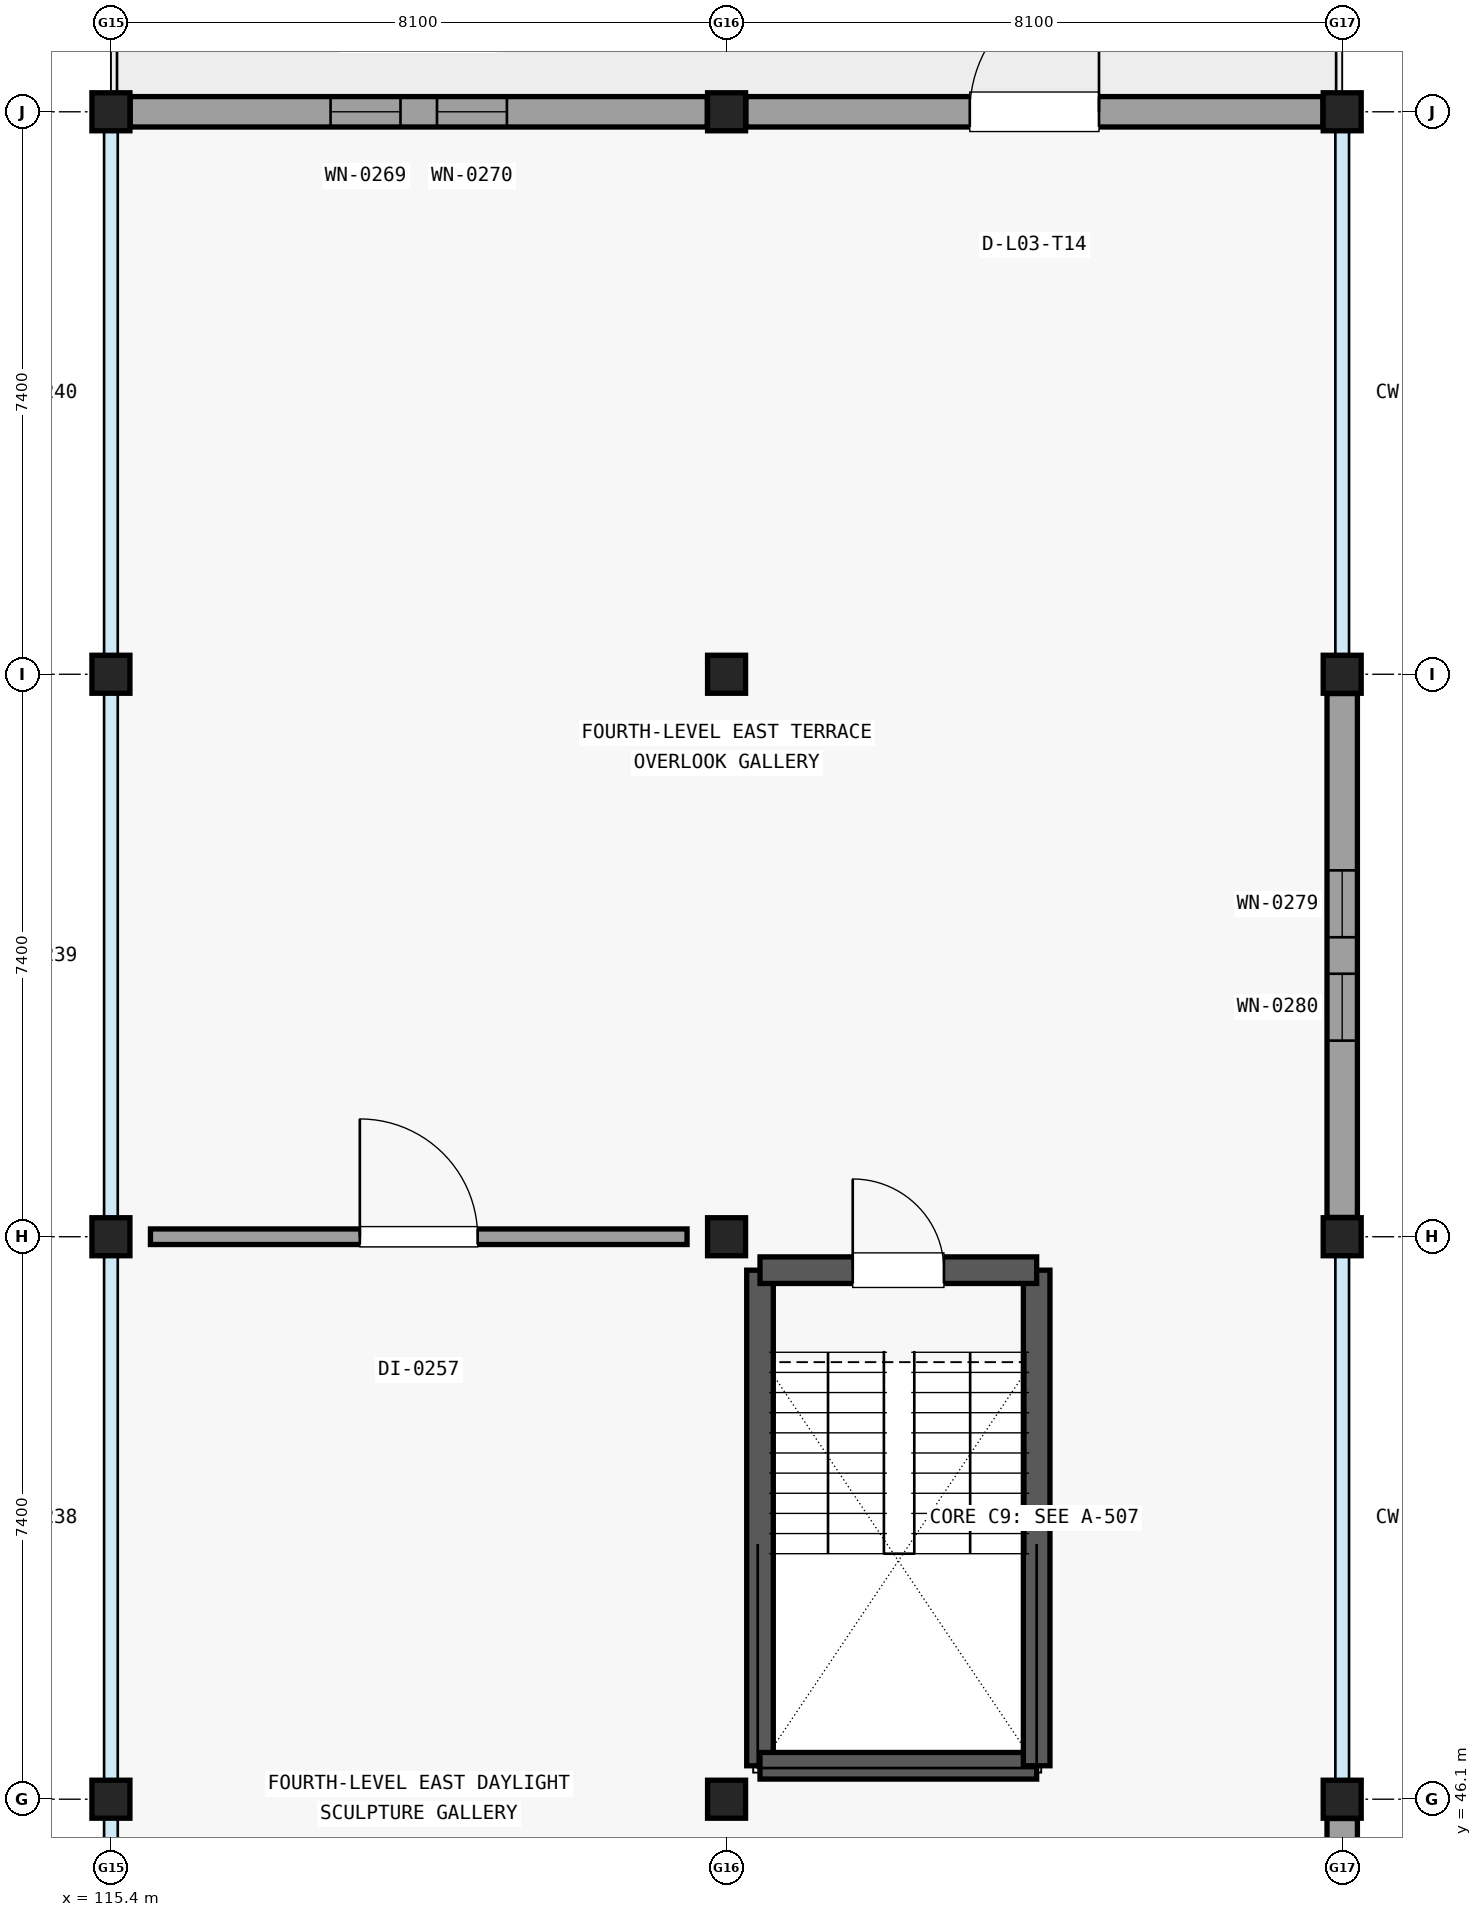
"""IFC4 building model, lengths in metres.
Left out: names, types, materials, properties, quantities, classifications, styles, units other than length and angle.
Written with IfcOpenShell. Run it as: python <this file> out.ifc"""

import sys

from ifc_helpers import new_model, si_unit, direction, frame, frame_2d, origin, origin_2d, place, context, subcontext, project, spatial, rectangle, extrude, element, fill, save


model = new_model("IFC4")
c1 = context("Model", 3, precision=1e-05, world=origin(), true_north=direction((0.0, 1.0)))
c2 = subcontext(c1, "Body", "Model", "MODEL_VIEW")
j1 = project(units=[si_unit("LENGTHUNIT", "METRE"), si_unit("PLANEANGLEUNIT", "RADIAN")], contexts=[c1])
p1 = place(None, origin())
s1 = spatial("IfcSite", under=j1, at=p1, CompositionType="ELEMENT")
p2 = place(p1, origin())
s2 = spatial("IfcBuilding", under=s1, at=p2, CompositionType="ELEMENT")
p3 = place(p2, frame((0.0, 0.0, 13.8)))
s3 = spatial("IfcBuildingStorey", under=s2, at=p3, CompositionType="ELEMENT", Elevation=13.8)
for number, where, z_axis, x_axis in (
    (1, (115.4, 46.1, 0.0), (0.0, 0.0, 1.0), (1.0, 0.0, 0.0)),
    (2, (115.4, 53.5, 0.0), (0.0, 0.0, 1.0), (1.0, 0.0, 0.0)),
    (3, (115.4, 60.9, 0.0), (0.0, 0.0, 1.0), (1.0, 0.0, 0.0)),
    (4, (115.4, 68.3, 0.0), (0.0, 0.0, 1.0), (1.0, 0.0, 0.0)),
    (5, (123.5, 46.1, 0.0), (0.0, 0.0, 1.0), (1.0, 0.0, 0.0)),
    (6, (123.5, 53.5, 0.0), (0.0, 0.0, 1.0), (1.0, 0.0, 0.0)),
    (7, (123.5, 60.9, 0.0), (0.0, 0.0, 1.0), (1.0, 0.0, 0.0)),
    (8, (123.5, 68.3, 0.0), (0.0, 0.0, 1.0), (1.0, 0.0, 0.0)),
    (9, (131.6, 46.1, 0.0), (0.0, 0.0, 1.0), (1.0, 0.0, 0.0)),
    (10, (131.6, 53.5, 0.0), (0.0, 0.0, 1.0), (1.0, 0.0, 0.0)),
    (11, (131.6, 60.9, 0.0), (0.0, 0.0, 1.0), (1.0, 0.0, 0.0)),
    (12, (131.6, 68.3, 0.0), (0.0, 0.0, 1.0), (1.0, 0.0, 0.0)),
):
    element("IfcColumn", number, at=place(p3, frame(where, z_axis=z_axis, x_axis=x_axis)), inside=s3, PredefinedType="COLUMN", context=c2, shape_type="SweptSolid", body=[
        extrude(rectangle(XDim=0.5, YDim=0.5, at=origin_2d()), origin(), (0.0, 0.0, 1.0), 3.38),
    ])
p4 = place(p3, frame((115.654, 68.3, 0.0), z_axis=(0.0, 0.0, 1.0), x_axis=(1.0, 0.0, 0.0)))
e13 = element("IfcWall", 13, at=p4, inside=s3, PredefinedType="SOLIDWALL", context=c2, shape_type="SweptSolid", body=[
    extrude(rectangle(XDim=7.592, YDim=0.4, at=frame_2d((3.796, 0.0))), origin(), (0.0, 0.0, 1.0), 2.908),
])
p5 = place(p4, frame((2.636, 0.0, 0.6)))
e14 = element("IfcOpeningElement", 14, at=p5, cuts=e13, PredefinedType="OPENING", context=c2, shape_type="SweptSolid", body=[
    extrude(rectangle(XDim=0.92, YDim=2.02, at=frame_2d((0.46, 1.01))), frame((0.0, 0.21, 0.0), z_axis=(0.0, -1.0, 0.0), x_axis=(1.0, 0.0, 0.0)), (0.0, 0.0, 1.0), 0.42),
])
p6 = place(p4, frame((4.036, 0.0, 0.6)))
e15 = element("IfcOpeningElement", 15, at=p6, cuts=e13, PredefinedType="OPENING", context=c2, shape_type="SweptSolid", body=[
    extrude(rectangle(XDim=0.92, YDim=2.02, at=frame_2d((0.46, 1.01))), frame((0.0, 0.21, 0.0), z_axis=(0.0, -1.0, 0.0), x_axis=(1.0, 0.0, 0.0)), (0.0, 0.0, 1.0), 0.42),
])
p7 = place(p3, frame((131.6, 45.846, 0.0), z_axis=(0.0, 0.0, 1.0), x_axis=(0.0, -1.0, 0.0)))
e16 = element("IfcWall", 16, at=p7, inside=s3, PredefinedType="SOLIDWALL", context=c2, shape_type="SweptSolid", body=[
    extrude(rectangle(XDim=6.892, YDim=0.4, at=frame_2d((3.446, 0.0))), origin(), (0.0, 0.0, 1.0), 2.908),
])
p8 = place(p7, frame((2.366, 0.0, 0.6)))
e17 = element("IfcOpeningElement", 17, at=p8, cuts=e16, PredefinedType="OPENING", context=c2, shape_type="SweptSolid", body=[
    extrude(rectangle(XDim=0.84, YDim=1.96, at=frame_2d((0.42, 0.98))), frame((0.0, 0.21, 0.0), z_axis=(0.0, -1.0, 0.0), x_axis=(1.0, 0.0, 0.0)), (0.0, 0.0, 1.0), 0.42),
])
p9 = place(p7, frame((3.686, 0.0, 0.6)))
e18 = element("IfcOpeningElement", 18, at=p9, cuts=e16, PredefinedType="OPENING", context=c2, shape_type="SweptSolid", body=[
    extrude(rectangle(XDim=0.84, YDim=1.96, at=frame_2d((0.42, 0.98))), frame((0.0, 0.21, 0.0), z_axis=(0.0, -1.0, 0.0), x_axis=(1.0, 0.0, 0.0)), (0.0, 0.0, 1.0), 0.42),
])
p10 = place(p3, frame((131.6, 60.646, 0.0), z_axis=(0.0, 0.0, 1.0), x_axis=(0.0, -1.0, 0.0)))
e19 = element("IfcWall", 19, at=p10, inside=s3, PredefinedType="SOLIDWALL", context=c2, shape_type="SweptSolid", body=[
    extrude(rectangle(XDim=6.892, YDim=0.4, at=frame_2d((3.446, 0.0))), origin(), (0.0, 0.0, 1.0), 2.908),
])
p11 = place(p10, frame((2.326, 0.0, 0.6)))
e20 = element("IfcOpeningElement", 20, at=p11, cuts=e19, PredefinedType="OPENING", context=c2, shape_type="SweptSolid", body=[
    extrude(rectangle(XDim=0.88, YDim=1.94, at=frame_2d((0.44, 0.97))), frame((0.0, 0.21, 0.0), z_axis=(0.0, -1.0, 0.0), x_axis=(1.0, 0.0, 0.0)), (0.0, 0.0, 1.0), 0.42),
])
p12 = place(p10, frame((3.686, 0.0, 0.6)))
e21 = element("IfcOpeningElement", 21, at=p12, cuts=e19, PredefinedType="OPENING", context=c2, shape_type="SweptSolid", body=[
    extrude(rectangle(XDim=0.88, YDim=1.94, at=frame_2d((0.44, 0.97))), frame((0.0, 0.21, 0.0), z_axis=(0.0, -1.0, 0.0), x_axis=(1.0, 0.0, 0.0)), (0.0, 0.0, 1.0), 0.42),
])
p13 = place(p3, frame((123.754, 68.3, 0.0), z_axis=(0.0, 0.0, 1.0), x_axis=(1.0, 0.0, 0.0)))
e22 = element("IfcWall", 22, at=p13, inside=s3, PredefinedType="SOLIDWALL", context=c2, shape_type="SweptSolid", body=[
    extrude(rectangle(XDim=7.592, YDim=0.4, at=frame_2d((3.796, 0.0))), origin(), (0.0, 0.0, 1.0), 2.908),
])
p14 = place(p13, frame((2.946, 0.0, 0.0)))
e23 = element("IfcOpeningElement", 23, at=p14, cuts=e22, PredefinedType="OPENING", context=c2, shape_type="SweptSolid", body=[
    extrude(rectangle(XDim=1.7, YDim=2.15, at=frame_2d((0.85, 1.075))), frame((0.0, 0.21, 0.0), z_axis=(0.0, -1.0, 0.0), x_axis=(1.0, 0.0, 0.0)), (0.0, 0.0, 1.0), 0.42),
])
p15 = place(p3, frame((123.94, 46.54, 0.0), z_axis=(0.0, 0.0, 1.0), x_axis=(0.0, 1.0, 0.0)))
e24 = element("IfcWall", 24, at=p15, inside=s3, PredefinedType="SHEAR", context=c2, shape_type="SweptSolid", body=[
    extrude(rectangle(XDim=6.52, YDim=0.35, at=frame_2d((3.26, 0.0))), origin(), (0.0, 0.0, 1.0), 3.375),
])
p16 = place(p3, frame((123.94, 46.54, 0.0), z_axis=(0.0, 0.0, 1.0), x_axis=(1.0, 0.0, 0.0)))
e25 = element("IfcWall", 25, at=p16, inside=s3, PredefinedType="SHEAR", context=c2, shape_type="SweptSolid", body=[
    extrude(rectangle(XDim=3.64, YDim=0.35, at=frame_2d((1.82, 0.0))), origin(), (0.0, 0.0, 1.0), 3.375),
])
p17 = place(p3, frame((127.58, 46.54, 0.0), z_axis=(0.0, 0.0, 1.0), x_axis=(0.0, 1.0, 0.0)))
e26 = element("IfcWall", 26, at=p17, inside=s3, PredefinedType="SHEAR", context=c2, shape_type="SweptSolid", body=[
    extrude(rectangle(XDim=6.52, YDim=0.35, at=frame_2d((3.26, 0.0))), origin(), (0.0, 0.0, 1.0), 3.375),
])
p18 = place(p3, frame((123.94, 53.06, 0.0), z_axis=(0.0, 0.0, 1.0), x_axis=(1.0, 0.0, 0.0)))
e27 = element("IfcWall", 27, at=p18, inside=s3, PredefinedType="SHEAR", context=c2, shape_type="SweptSolid", body=[
    extrude(rectangle(XDim=3.64, YDim=0.35, at=frame_2d((1.82, 0.0))), origin(), (0.0, 0.0, 1.0), 3.375),
])
p19 = place(p18, frame((1.22, 0.0, 0.0)))
e28 = element("IfcOpeningElement", 28, at=p19, cuts=e27, PredefinedType="OPENING", context=c2, shape_type="SweptSolid", body=[
    extrude(rectangle(XDim=1.2, YDim=2.15, at=frame_2d((0.6, 1.075))), frame((0.0, 0.185, 0.0), z_axis=(0.0, -1.0, 0.0), x_axis=(1.0, 0.0, 0.0)), (0.0, 0.0, 1.0), 0.37),
])
p20 = place(p3, frame((115.92, 53.5, 0.0), z_axis=(0.0, 0.0, 1.0), x_axis=(1.0, 0.0, 0.0)))
e29 = element("IfcWall", 29, at=p20, inside=s3, PredefinedType="PARTITIONING", context=c2, shape_type="SweptSolid", body=[
    extrude(rectangle(XDim=7.06, YDim=0.205, at=frame_2d((3.53, 0.0))), origin(), (0.0, 0.0, 1.0), 2.913),
])
p21 = place(p20, frame((2.755, 0.0, 0.0)))
e30 = element("IfcOpeningElement", 30, at=p21, cuts=e29, PredefinedType="OPENING", context=c2, shape_type="SweptSolid", body=[
    extrude(rectangle(XDim=1.55, YDim=2.2, at=frame_2d((0.775, 1.1))), frame((0.0, 0.113, 0.0), z_axis=(0.0, -1.0, 0.0), x_axis=(1.0, 0.0, 0.0)), (0.0, 0.0, 1.0), 0.225),
])
p22 = place(p5, origin())
e31 = element("IfcWindow", 31, at=p22, inside=s3, PartitioningType="SINGLE_PANEL", PredefinedType="WINDOW", context=c2, shape_type="SweptSolid", body=[
    extrude(rectangle(XDim=0.92, YDim=2.02, at=frame_2d((0.46, 1.01))), frame((0.0, 0.03, 0.0), z_axis=(0.0, -1.0, 0.0), x_axis=(1.0, 0.0, 0.0)), (0.0, 0.0, 1.0), 0.06),
])
fill(e14, e31)
p23 = place(p6, origin())
e32 = element("IfcWindow", 32, at=p23, inside=s3, PartitioningType="SINGLE_PANEL", PredefinedType="WINDOW", context=c2, shape_type="SweptSolid", body=[
    extrude(rectangle(XDim=0.92, YDim=2.02, at=frame_2d((0.46, 1.01))), frame((0.0, 0.03, 0.0), z_axis=(0.0, -1.0, 0.0), x_axis=(1.0, 0.0, 0.0)), (0.0, 0.0, 1.0), 0.06),
])
fill(e15, e32)
p24 = place(p11, origin())
e33 = element("IfcWindow", 33, at=p24, inside=s3, PartitioningType="SINGLE_PANEL", PredefinedType="WINDOW", context=c2, shape_type="SweptSolid", body=[
    extrude(rectangle(XDim=0.88, YDim=1.94, at=frame_2d((0.44, 0.97))), frame((0.0, 0.03, 0.0), z_axis=(0.0, -1.0, 0.0), x_axis=(1.0, 0.0, 0.0)), (0.0, 0.0, 1.0), 0.06),
])
fill(e20, e33)
p25 = place(p12, origin())
e34 = element("IfcWindow", 34, at=p25, inside=s3, PartitioningType="SINGLE_PANEL", PredefinedType="WINDOW", context=c2, shape_type="SweptSolid", body=[
    extrude(rectangle(XDim=0.88, YDim=1.94, at=frame_2d((0.44, 0.97))), frame((0.0, 0.03, 0.0), z_axis=(0.0, -1.0, 0.0), x_axis=(1.0, 0.0, 0.0)), (0.0, 0.0, 1.0), 0.06),
])
fill(e21, e34)
p26 = place(p14, origin())
e35 = element("IfcDoor", 35, at=p26, inside=s3, OperationType="SINGLE_SWING_RIGHT", PredefinedType="DOOR", context=c2, shape_type="SweptSolid", body=[
    extrude(rectangle(XDim=1.7, YDim=2.15, at=frame_2d((0.85, 1.075))), frame((0.0, 0.025, 0.0), z_axis=(0.0, -1.0, 0.0), x_axis=(1.0, 0.0, 0.0)), (0.0, 0.0, 1.0), 0.05),
])
fill(e23, e35)
p27 = place(p19, origin())
e36 = element("IfcDoor", 36, at=p27, inside=s3, OperationType="SINGLE_SWING_LEFT", PredefinedType="DOOR", context=c2, shape_type="SweptSolid", body=[
    extrude(rectangle(XDim=1.2, YDim=2.15, at=frame_2d((0.6, 1.075))), frame((0.0, 0.025, 0.0), z_axis=(0.0, -1.0, 0.0), x_axis=(1.0, 0.0, 0.0)), (0.0, 0.0, 1.0), 0.05),
])
fill(e28, e36)
p28 = place(p21, origin())
e37 = element("IfcDoor", 37, at=p28, inside=s3, OperationType="SINGLE_SWING_LEFT", PredefinedType="DOOR", context=c2, shape_type="SweptSolid", body=[
    extrude(rectangle(XDim=1.55, YDim=2.2, at=frame_2d((0.775, 1.1))), frame((0.0, 0.025, 0.0), z_axis=(0.0, -1.0, 0.0), x_axis=(1.0, 0.0, 0.0)), (0.0, 0.0, 1.0), 0.05),
])
fill(e30, e37)
save(model, sys.argv[1])
